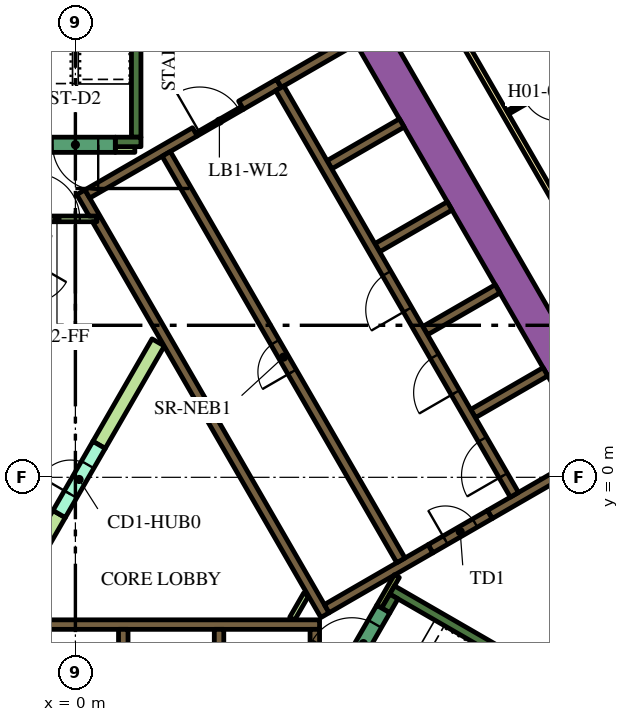
"""IFC4 building model, lengths in metres.
Left out: names, types, materials, properties, quantities, classifications, styles, units other than length and angle.
Written with IfcOpenShell. Run it as: python <this file> out.ifc"""

import sys

from ifc_helpers import new_model, si_unit, direction, frame, frame_2d, origin, place, context, subcontext, project, spatial, polyline, rectangle, outline, extrude, element, fill, save


model = new_model("IFC4")
c1 = context("Model", 3, precision=1e-05, world=origin(), true_north=direction((0.0, 1.0)))
c2 = subcontext(c1, "Body", "Model", "MODEL_VIEW")
j1 = project(units=[si_unit("LENGTHUNIT", "METRE"), si_unit("PLANEANGLEUNIT", "RADIAN")], contexts=[c1])
p1 = place(None, origin())
s1 = spatial("IfcSite", under=j1, at=p1, CompositionType="ELEMENT")
p2 = place(p1, origin())
s2 = spatial("IfcBuilding", under=s1, at=p2, CompositionType="ELEMENT")
p3 = place(p2, frame((0.0, 0.0, 31.5)))
s3 = spatial("IfcBuildingStorey", under=s2, at=p3, CompositionType="ELEMENT", Elevation=31.5)
p4 = place(p3, frame((6.711, 13.476, 0.0), z_axis=(0.0, 0.0, 1.0), x_axis=(0.500002723396, -0.866023831425, 0.0)))
e1 = element("IfcWall", 1, at=p4, inside=s3, PredefinedType="SOLIDWALL", context=c2, shape_type="SweptSolid", body=[
    extrude(rectangle(XDim=20.334, YDim=0.9, at=frame_2d((10.167, 0.0))), origin(), (0.0, 0.0, 1.0), 3.9),
])
p5 = place(p3, frame((11.695, -12.644, 0.0), z_axis=(0.0, 0.0, 1.0), x_axis=(0.500010229568, 0.86601949766, 0.0)))
e2 = element("IfcWall", 2, at=p5, inside=s3, PredefinedType="SOLIDWALL", context=c2, shape_type="SweptSolid", body=[
    extrude(rectangle(XDim=9.326, YDim=0.9, at=frame_2d((4.663, 0.0))), origin(), (0.0, 0.0, 1.0), 3.9),
])
p6 = place(p3, frame((8.334, -2.964, 0.0), z_axis=(0.0, 0.0, 1.0), x_axis=(0.866016039709, -0.500016218704, 0.0)))
e3 = element("IfcWall", 3, at=p6, inside=s3, PredefinedType="SOLIDWALL", context=c2, shape_type="SweptSolid", body=[
    extrude(rectangle(XDim=7.05, YDim=0.25, at=frame_2d((3.525, 0.0))), origin(), (0.0, 0.0, 1.0), 3.9),
])
p7 = place(p3, frame((8.168, -3.503, 0.0), z_axis=(0.0, 0.0, 1.0), x_axis=(0.49972245349, 0.866185586049, 0.0)))
e4 = element("IfcWall", 4, at=p7, inside=s3, PredefinedType="SOLIDWALL", context=c2, shape_type="SweptSolid", body=[
    extrude(rectangle(XDim=0.425, YDim=0.25, at=frame_2d((0.212, 0.0))), origin(), (0.0, 0.0, 1.0), 3.9),
])
p8 = place(p3, frame((1.6, 8.95, 0.0), z_axis=(0.0, 0.0, 1.0), x_axis=(0.0, 1.0, 0.0)))
e5 = element("IfcWall", 5, at=p8, inside=s3, PredefinedType="SOLIDWALL", context=c2, shape_type="SweptSolid", body=[
    extrude(rectangle(XDim=6.8, YDim=0.25, at=frame_2d((3.4, 0.0))), origin(), (0.0, 0.0, 1.0), 3.9),
])
p9 = place(p3, frame((1.05, 8.825, 0.0), z_axis=(0.0, 0.0, 1.0), x_axis=(1.0, 0.0, 0.0)))
e6 = element("IfcWall", 6, at=p9, inside=s3, PredefinedType="SOLIDWALL", context=c2, shape_type="SweptSolid", body=[
    extrude(rectangle(XDim=0.675, YDim=0.25, at=frame_2d((0.337, 0.0))), origin(), (0.0, 0.0, 1.0), 3.9),
])
p10 = place(p3, frame((-5.545, -3.875, 0.0), z_axis=(0.0, 0.0, 1.0), x_axis=(1.0, 0.0, 0.0)))
e7 = element("IfcWall", 7, at=p10, inside=s3, PredefinedType="SOLIDWALL", context=c2, shape_type="SweptSolid", body=[
    extrude(rectangle(XDim=11.97, YDim=0.25, at=frame_2d((5.985, 0.0))), origin(), (0.0, 0.0, 1.0), 3.9),
])
p11 = place(p3, frame((6.3, -7.268, 0.0), z_axis=(0.0, 0.0, 1.0), x_axis=(0.0, 1.0, 0.0)))
e8 = element("IfcWall", 8, at=p11, inside=s3, PredefinedType="SOLIDWALL", context=c2, shape_type="SweptSolid", body=[
    extrude(rectangle(XDim=3.268, YDim=0.25, at=frame_2d((1.634, 0.0))), origin(), (0.0, 0.0, 1.0), 3.9),
])
for number, where, z_axis, x_axis in (
    (9, (3.78, -4.0, 0.0), (0.0, 0.0, 1.0), (0.0, -1.0, 0.0)),
    (10, (1.26, -4.0, 0.0), (0.0, 0.0, 1.0), (0.0, -1.0, 0.0)),
    (11, (10.464, 1.677, 0.0), (0.0, 0.0, 1.0), (0.866, 0.5, 0.0)),
):
    element("IfcWall", number, at=place(p3, frame(where, z_axis=z_axis, x_axis=x_axis)), inside=s3, PredefinedType="SOLIDWALL", context=c2, shape_type="SweptSolid", body=[
        extrude(rectangle(XDim=2.2, YDim=0.25, at=frame_2d((1.1, 0.0))), origin(), (0.0, 0.0, 1.0), 3.9),
    ])
p12 = place(p3, frame((13.629, 0.594, 0.0), z_axis=(0.0, 0.0, 1.0), x_axis=(-0.86602790099, -0.499995674689, 0.0)))
e12 = element("IfcWall", 12, at=p12, inside=s3, PredefinedType="SOLIDWALL", context=c2, shape_type="SweptSolid", body=[
    extrude(rectangle(XDim=3.146, YDim=0.25, at=frame_2d((1.573, 0.0))), origin(), (0.0, 0.0, 1.0), 3.9),
])
p13 = place(p3, origin())
e13 = element("IfcWall", 13, at=p13, inside=s3, PredefinedType="SOLIDWALL", context=c2, shape_type="SweptSolid", body=[
    extrude(outline(polyline([(0.566, 6.725), (0.566, 6.875), (0.566, 6.875), (0.565, 6.875), (0.361, 6.875), (0.035, 7.439), (0.252, 7.564), (0.377, 7.348), (6.552, -3.348), (6.677, -3.564), (6.46, -3.689), (0.448, 6.725), (0.565, 6.725), (0.566, 6.725), (0.566, 6.725)])), origin(), (0.0, 0.0, 1.0), 3.9),
])
p14 = place(p3, frame((4.358, 9.791, 0.0), z_axis=(0.0, 0.0, 1.0), x_axis=(0.866079547155, 0.499906209203, 0.0)))
e14 = element("IfcWall", 14, at=p14, inside=s3, PredefinedType="SOLIDWALL", context=c2, shape_type="SweptSolid", body=[
    extrude(rectangle(XDim=1.15, YDim=0.25, at=frame_2d((0.575, 0.0))), origin(), (0.0, 0.0, 1.0), 3.9),
])
p15 = place(p3, frame((5.356, 10.367, 0.0), z_axis=(0.0, 0.0, 1.0), x_axis=(0.865978535641, 0.50008116922, 0.0)))
e15 = element("IfcWall", 15, at=p15, inside=s3, PredefinedType="SOLIDWALL", context=c2, shape_type="SweptSolid", body=[
    extrude(rectangle(XDim=2.278, YDim=0.25, at=frame_2d((1.139, 0.0))), origin(), (0.0, 0.0, 1.0), 3.9),
])
p16 = place(p3, frame((0.314, 7.456, 0.0), z_axis=(0.0, 0.0, 1.0), x_axis=(0.866013897511, 0.50001992892, 0.0)))
e16 = element("IfcWall", 16, at=p16, inside=s3, PredefinedType="SOLIDWALL", context=c2, shape_type="SweptSolid", body=[
    extrude(rectangle(XDim=3.268, YDim=0.25, at=frame_2d((1.634, 0.0))), origin(), (0.0, 0.0, 1.0), 3.9),
])
p17 = place(p3, frame((6.614, -3.456, 0.0), z_axis=(0.0, 0.0, 1.0), x_axis=(0.86602447079, 0.500001615989, 0.0)))
e17 = element("IfcWall", 17, at=p17, inside=s3, PredefinedType="SOLIDWALL", context=c2, shape_type="SweptSolid", body=[
    extrude(rectangle(XDim=3.154, YDim=0.25, at=frame_2d((1.577, 0.0))), origin(), (0.0, 0.0, 1.0), 3.9),
])
for number, where, z_axis, x_axis in (
    (18, (6.684, 8.224, 0.0), (0.0, 0.0, 1.0), (0.866, 0.5, 0.0)),
    (19, (7.944, 6.041, 0.0), (0.0, 0.0, 1.0), (0.866, 0.5, 0.0)),
    (20, (9.204, 3.859, 0.0), (0.0, 0.0, 1.0), (0.866, 0.5, 0.0)),
):
    element("IfcWall", number, at=place(p3, frame(where, z_axis=z_axis, x_axis=x_axis)), inside=s3, PredefinedType="SOLIDWALL", context=c2, shape_type="SweptSolid", body=[
        extrude(rectangle(XDim=2.2, YDim=0.25, at=frame_2d((1.1, 0.0))), origin(), (0.0, 0.0, 1.0), 3.9),
    ])
p18 = place(p3, frame((5.705, -3.718, 0.0), z_axis=(0.0, 0.0, 1.0), x_axis=(0.499962090823, 0.866047289552, 0.0)))
e21 = element("IfcWall", 21, at=p18, inside=s3, PredefinedType="PARTITIONING", context=c2, shape_type="SweptSolid", body=[
    extrude(rectangle(XDim=0.735, YDim=0.15, at=frame_2d((0.367, 0.0))), origin(), (0.0, 0.0, 1.0), 2.75),
])
p19 = place(p3, frame((8.459, -2.599, 0.0), z_axis=(0.0, 0.0, 1.0), x_axis=(-0.500041054325, -0.866001699761, 0.0)))
e22 = element("IfcWall", 22, at=p19, inside=s3, PredefinedType="PARTITIONING", context=c2, shape_type="SweptSolid", body=[
    extrude(rectangle(XDim=0.929, YDim=0.15, at=frame_2d((0.464, 0.0))), origin(), (0.0, 0.0, 1.0), 3.9),
])
e23 = element("IfcWall", 23, at=p13, inside=s3, PredefinedType="PARTITIONING", context=c2, shape_type="SweptSolid", body=[
    extrude(outline(polyline([(-0.59, -0.872), (-0.265, -1.059), (-1.822, -3.756), (-2.147, -3.568), (-0.59, -0.872)])), origin(), (0.0, 0.0, 1.0), 2.75),
])
e24 = element("IfcWall", 24, at=p13, inside=s3, PredefinedType="PARTITIONING", context=c2, shape_type="SweptSolid", body=[
    extrude(outline(polyline([(2.017, 3.643), (2.342, 3.456), (0.785, 0.76), (0.46, 0.947), (2.017, 3.643)])), origin(), (0.0, 0.0, 1.0), 2.75),
])
p20 = place(p3, frame((1.05, 8.625, 0.0), z_axis=(0.0, 0.0, 1.0), x_axis=(1.0, 0.0, 0.0)))
e25 = element("IfcWall", 25, at=p20, inside=s3, PredefinedType="PARTITIONING", context=c2, shape_type="SweptSolid", body=[
    extrude(rectangle(XDim=0.514, YDim=0.15, at=frame_2d((0.257, 0.0))), origin(), (0.0, 0.0, 1.0), 2.75),
])
p21 = place(p3, frame((11.553, -0.46, 0.0), z_axis=(0.0, 0.0, 1.0), x_axis=(-0.500006514828, 0.866021642414, 0.0)))
e26 = element("IfcWall", 26, at=p21, inside=s3, PredefinedType="SOLIDWALL", context=c2, shape_type="SweptSolid", body=[
    extrude(rectangle(XDim=12.35, YDim=0.25, at=frame_2d((6.175, 0.0))), origin(), (0.0, 0.0, 1.0), 3.9),
])
p22 = place(p21, frame((0.585, 0.0, 0.0)))
e27 = element("IfcOpeningElement", 27, at=p22, cuts=e26, PredefinedType="OPENING", context=c2, shape_type="SweptSolid", body=[
    extrude(rectangle(XDim=1.1, YDim=2.1, at=frame_2d((0.55, 1.05))), frame((0.0, 0.135, 0.0), z_axis=(0.0, -1.0, 0.0), x_axis=(1.0, 0.0, 0.0)), (0.0, 0.0, 1.0), 0.27),
])
p23 = place(p21, frame((3.105, 0.0, 0.0)))
e28 = element("IfcOpeningElement", 28, at=p23, cuts=e26, PredefinedType="OPENING", context=c2, shape_type="SweptSolid", body=[
    extrude(rectangle(XDim=1.1, YDim=2.1, at=frame_2d((0.55, 1.05))), frame((0.0, 0.135, 0.0), z_axis=(0.0, -1.0, 0.0), x_axis=(1.0, 0.0, 0.0)), (0.0, 0.0, 1.0), 0.27),
])
p24 = place(p21, frame((5.625, 0.0, 0.0)))
e29 = element("IfcOpeningElement", 29, at=p24, cuts=e26, PredefinedType="OPENING", context=c2, shape_type="SweptSolid", body=[
    extrude(rectangle(XDim=1.1, YDim=2.1, at=frame_2d((0.55, 1.05))), frame((0.0, 0.135, 0.0), z_axis=(0.0, -1.0, 0.0), x_axis=(1.0, 0.0, 0.0)), (0.0, 0.0, 1.0), 0.27),
])
p25 = place(p3, frame((8.565, -2.185, 0.0), z_axis=(0.0, 0.0, 1.0), x_axis=(-0.499997954832, 0.866026584559, 0.0)))
e30 = element("IfcWall", 30, at=p25, inside=s3, PredefinedType="SOLIDWALL", context=c2, shape_type="SweptSolid", body=[
    extrude(rectangle(XDim=12.35, YDim=0.25, at=frame_2d((6.175, 0.0))), origin(), (0.0, 0.0, 1.0), 3.9),
])
p26 = place(p25, frame((5.725, 0.0, 0.0)))
e31 = element("IfcOpeningElement", 31, at=p26, cuts=e30, PredefinedType="OPENING", context=c2, shape_type="SweptSolid", body=[
    extrude(rectangle(XDim=0.9, YDim=2.1, at=frame_2d((0.45, 1.05))), frame((0.0, 0.135, 0.0), z_axis=(0.0, -1.0, 0.0), x_axis=(1.0, 0.0, 0.0)), (0.0, 0.0, 1.0), 0.27),
])
p27 = place(p3, frame((7.053, -5.284, 0.0), z_axis=(0.0, 0.0, 1.0), x_axis=(0.500078061341, 0.865980330357, 0.0)))
e32 = element("IfcWall", 32, at=p27, inside=s3, PredefinedType="SOLIDWALL", context=c2, shape_type="SweptSolid", body=[
    extrude(rectangle(XDim=2.1, YDim=0.4, at=frame_2d((1.05, 0.0))), origin(), (0.0, 0.0, 1.0), 3.9),
])
p28 = place(p27, frame((0.45, 0.0, 0.0)))
e33 = element("IfcOpeningElement", 33, at=p28, cuts=e32, PredefinedType="OPENING", context=c2, shape_type="SweptSolid", body=[
    extrude(rectangle(XDim=1.2, YDim=2.1, at=frame_2d((0.6, 1.05))), frame((0.0, 0.21, 0.0), z_axis=(0.0, -1.0, 0.0), x_axis=(1.0, 0.0, 0.0)), (0.0, 0.0, 1.0), 0.42),
])
p29 = place(p3, frame((9.346, -1.879, 0.0), z_axis=(0.0, 0.0, 1.0), x_axis=(0.866047807691, 0.499961193289, 0.0)))
e34 = element("IfcWall", 34, at=p29, inside=s3, PredefinedType="SOLIDWALL", context=c2, shape_type="SweptSolid", body=[
    extrude(rectangle(XDim=1.8, YDim=0.25, at=frame_2d((0.9, 0.0))), origin(), (0.0, 0.0, 1.0), 3.9),
])
p30 = place(p29, frame((0.45, 0.0, 0.0)))
e35 = element("IfcOpeningElement", 35, at=p30, cuts=e34, PredefinedType="OPENING", context=c2, shape_type="SweptSolid", body=[
    extrude(rectangle(XDim=0.9, YDim=2.1, at=frame_2d((0.45, 1.05))), frame((0.0, 0.135, 0.0), z_axis=(0.0, -1.0, 0.0), x_axis=(1.0, 0.0, 0.0)), (0.0, 0.0, 1.0), 0.27),
])
p31 = place(p3, frame((1.05, 8.75, 0.0), z_axis=(0.0, 0.0, 1.0), x_axis=(-1.0, 0.0, 0.0)))
e36 = element("IfcWall", 36, at=p31, inside=s3, PredefinedType="SOLIDWALL", context=c2, shape_type="SweptSolid", body=[
    extrude(rectangle(XDim=2.1, YDim=0.4, at=frame_2d((1.05, 0.0))), origin(), (0.0, 0.0, 1.0), 3.9),
])
p32 = place(p31, frame((0.45, 0.0, 0.0)))
e37 = element("IfcOpeningElement", 37, at=p32, cuts=e36, PredefinedType="OPENING", context=c2, shape_type="SweptSolid", body=[
    extrude(rectangle(XDim=1.2, YDim=2.1, at=frame_2d((0.6, 1.05))), frame((0.0, 0.21, 0.0), z_axis=(0.0, -1.0, 0.0), x_axis=(1.0, 0.0, 0.0)), (0.0, 0.0, 1.0), 0.42),
])
p33 = place(p3, frame((-0.427, -0.966, 0.0), z_axis=(0.0, 0.0, 1.0), x_axis=(0.49994051562, 0.866059744384, 0.0)))
e38 = element("IfcWall", 38, at=p33, inside=s3, PredefinedType="PARTITIONING", context=c2, shape_type="SweptSolid", body=[
    extrude(rectangle(XDim=2.1, YDim=0.375, at=frame_2d((1.05, 0.0))), origin(), (0.0, 0.0, 1.0), 2.75),
])
p34 = place(p33, frame((0.6, 0.0, 0.0)))
e39 = element("IfcOpeningElement", 39, at=p34, cuts=e38, PredefinedType="OPENING", context=c2, shape_type="SweptSolid", body=[
    extrude(rectangle(XDim=0.9, YDim=2.1, at=frame_2d((0.45, 1.05))), frame((0.0, 0.198, 0.0), z_axis=(0.0, -1.0, 0.0), x_axis=(1.0, 0.0, 0.0)), (0.0, 0.0, 1.0), 0.395),
])
p35 = place(p3, frame((-1.534, 6.8, 0.0), z_axis=(0.0, 0.0, 1.0), x_axis=(1.0, 0.0, 0.0)))
e40 = element("IfcWall", 40, at=p35, inside=s3, PredefinedType="PARTITIONING", context=c2, shape_type="SweptSolid", body=[
    extrude(rectangle(XDim=2.1, YDim=0.15, at=frame_2d((1.05, 0.0))), origin(), (0.0, 0.0, 1.0), 2.75),
])
p36 = place(p35, frame((0.45, 0.0, 0.0)))
e41 = element("IfcOpeningElement", 41, at=p36, cuts=e40, PredefinedType="OPENING", context=c2, shape_type="SweptSolid", body=[
    extrude(rectangle(XDim=1.2, YDim=2.1, at=frame_2d((0.6, 1.05))), frame((0.0, 0.085, 0.0), z_axis=(0.0, -1.0, 0.0), x_axis=(1.0, 0.0, 0.0)), (0.0, 0.0, 1.0), 0.17),
])
p37 = place(p3, frame((3.183, 9.02, 0.0), z_axis=(0.0, 0.0, 1.0), x_axis=(0.866034573852, 0.49998411664, 0.0)))
e42 = element("IfcWall", 42, at=p37, inside=s3, PredefinedType="PARTITIONING", context=c2, shape_type="SweptSolid", body=[
    extrude(rectangle(XDim=1.4, YDim=0.09, at=frame_2d((0.7, 0.0))), origin(), (0.0, 0.0, 1.0), 2.75),
])
p38 = place(p37, frame((0.1, 0.0, 0.0)))
e43 = element("IfcOpeningElement", 43, at=p38, cuts=e42, PredefinedType="OPENING", context=c2, shape_type="SweptSolid", body=[
    extrude(rectangle(XDim=1.2, YDim=2.1, at=frame_2d((0.6, 1.05))), frame((0.0, 0.055, 0.0), z_axis=(0.0, -1.0, 0.0), x_axis=(1.0, 0.0, 0.0)), (0.0, 0.0, 1.0), 0.11),
])
p39 = place(p3, frame((6.163, 18.475, 0.0), z_axis=(0.0, 0.0, 1.0), x_axis=(0.500001317485, -0.866024643133, 0.0)))
e44 = element("IfcWall", 44, at=p39, inside=s3, PredefinedType="PARTITIONING", context=c2, shape_type="SweptSolid", body=[
    extrude(rectangle(XDim=25.767, YDim=0.15, at=frame_2d((12.883, 0.0))), origin(), (0.0, 0.0, 1.0), 2.75),
])
p40 = place(p39, frame((24.586, 0.0, 0.0)))
e45 = element("IfcOpeningElement", 45, at=p40, cuts=e44, PredefinedType="OPENING", context=c2, shape_type="SweptSolid", body=[
    extrude(rectangle(XDim=1.0, YDim=2.1, at=frame_2d((0.5, 1.05))), frame((0.0, 0.085, 0.0), z_axis=(0.0, -1.0, 0.0), x_axis=(1.0, 0.0, 0.0)), (0.0, 0.0, 1.0), 0.17),
])
p41 = place(p39, frame((19.319, 0.0, 0.0)))
e46 = element("IfcOpeningElement", 46, at=p41, cuts=e44, PredefinedType="OPENING", context=c2, shape_type="SweptSolid", body=[
    extrude(rectangle(XDim=1.0, YDim=2.1, at=frame_2d((0.5, 1.05))), frame((0.0, 0.085, 0.0), z_axis=(0.0, -1.0, 0.0), x_axis=(1.0, 0.0, 0.0)), (0.0, 0.0, 1.0), 0.17),
])
p42 = place(p39, frame((18.012, 0.0, 0.0)))
e47 = element("IfcOpeningElement", 47, at=p42, cuts=e44, PredefinedType="OPENING", context=c2, shape_type="SweptSolid", body=[
    extrude(rectangle(XDim=1.0, YDim=2.1, at=frame_2d((0.5, 1.05))), frame((0.0, 0.085, 0.0), z_axis=(0.0, -1.0, 0.0), x_axis=(1.0, 0.0, 0.0)), (0.0, 0.0, 1.0), 0.17),
])
p43 = place(p39, frame((6.824, 0.0, 0.0)))
e48 = element("IfcOpeningElement", 48, at=p43, cuts=e44, PredefinedType="OPENING", context=c2, shape_type="SweptSolid", body=[
    extrude(rectangle(XDim=1.1, YDim=2.1, at=frame_2d((0.55, 1.05))), frame((0.0, 0.085, 0.0), z_axis=(0.0, -1.0, 0.0), x_axis=(1.0, 0.0, 0.0)), (0.0, 0.0, 1.0), 0.17),
])
p44 = place(p39, frame((4.658, 0.0, 0.0)))
e49 = element("IfcOpeningElement", 49, at=p44, cuts=e44, PredefinedType="OPENING", context=c2, shape_type="SweptSolid", body=[
    extrude(rectangle(XDim=0.9, YDim=2.1, at=frame_2d((0.45, 1.05))), frame((0.0, 0.085, 0.0), z_axis=(0.0, -1.0, 0.0), x_axis=(1.0, 0.0, 0.0)), (0.0, 0.0, 1.0), 0.17),
])
p45 = place(p39, frame((0.18, 0.0, 0.0)))
e50 = element("IfcOpeningElement", 50, at=p45, cuts=e44, PredefinedType="OPENING", context=c2, shape_type="SweptSolid", body=[
    extrude(rectangle(XDim=1.0, YDim=2.1, at=frame_2d((0.5, 1.05))), frame((0.0, 0.085, 0.0), z_axis=(0.0, -1.0, 0.0), x_axis=(1.0, 0.0, 0.0)), (0.0, 0.0, 1.0), 0.17),
])
p46 = place(p3, frame((13.799, 10.999, 0.0), z_axis=(0.0, 0.0, 1.0), x_axis=(-0.866034573852, -0.49998411664, 0.0)))
e51 = element("IfcWall", 51, at=p46, inside=s3, PredefinedType="PARTITIONING", context=c2, shape_type="SweptSolid", body=[
    extrude(rectangle(XDim=2.8, YDim=0.1, at=frame_2d((1.4, 0.0))), origin(), (0.0, 0.0, 1.0), 2.75),
])
p47 = place(p46, frame((1.25, 0.0, 0.0)))
e52 = element("IfcOpeningElement", 52, at=p47, cuts=e51, PredefinedType="OPENING", context=c2, shape_type="SweptSolid", body=[
    extrude(rectangle(XDim=1.0, YDim=2.1, at=frame_2d((0.5, 1.05))), frame((0.0, 0.06, 0.0), z_axis=(0.0, -1.0, 0.0), x_axis=(1.0, 0.0, 0.0)), (0.0, 0.0, 1.0), 0.12),
])
p48 = place(p22, origin())
e53 = element("IfcDoor", 53, at=p48, inside=s3, OperationType="DOUBLE_DOOR_SLIDING", PredefinedType="DOOR", context=c2, shape_type="SweptSolid", body=[
    extrude(rectangle(XDim=1.1, YDim=2.1, at=frame_2d((0.55, 1.05))), frame((0.0, 0.025, 0.0), z_axis=(0.0, -1.0, 0.0), x_axis=(1.0, 0.0, 0.0)), (0.0, 0.0, 1.0), 0.05),
])
fill(e27, e53)
p49 = place(p23, origin())
e54 = element("IfcDoor", 54, at=p49, inside=s3, OperationType="DOUBLE_DOOR_SLIDING", PredefinedType="DOOR", context=c2, shape_type="SweptSolid", body=[
    extrude(rectangle(XDim=1.1, YDim=2.1, at=frame_2d((0.55, 1.05))), frame((0.0, 0.025, 0.0), z_axis=(0.0, -1.0, 0.0), x_axis=(1.0, 0.0, 0.0)), (0.0, 0.0, 1.0), 0.05),
])
fill(e28, e54)
p50 = place(p24, origin())
e55 = element("IfcDoor", 55, at=p50, inside=s3, OperationType="DOUBLE_DOOR_SLIDING", PredefinedType="DOOR", context=c2, shape_type="SweptSolid", body=[
    extrude(rectangle(XDim=1.1, YDim=2.1, at=frame_2d((0.55, 1.05))), frame((0.0, 0.025, 0.0), z_axis=(0.0, -1.0, 0.0), x_axis=(1.0, 0.0, 0.0)), (0.0, 0.0, 1.0), 0.05),
])
fill(e29, e55)
p51 = place(p26, origin())
e56 = element("IfcDoor", 56, at=p51, inside=s3, OperationType="SINGLE_SWING_LEFT", PredefinedType="DOOR", context=c2, shape_type="SweptSolid", body=[
    extrude(rectangle(XDim=0.9, YDim=2.1, at=frame_2d((0.45, 1.05))), frame((0.0, 0.025, 0.0), z_axis=(0.0, -1.0, 0.0), x_axis=(1.0, 0.0, 0.0)), (0.0, 0.0, 1.0), 0.05),
])
fill(e31, e56)
p52 = place(p28, origin())
e57 = element("IfcDoor", 57, at=p52, inside=s3, OperationType="SINGLE_SWING_LEFT", PredefinedType="DOOR", context=c2, shape_type="SweptSolid", body=[
    extrude(rectangle(XDim=1.2, YDim=2.1, at=frame_2d((0.6, 1.05))), frame((0.0, 0.025, 0.0), z_axis=(0.0, -1.0, 0.0), x_axis=(1.0, 0.0, 0.0)), (0.0, 0.0, 1.0), 0.05),
])
fill(e33, e57)
p53 = place(p30, origin())
e58 = element("IfcDoor", 58, at=p53, inside=s3, OperationType="SINGLE_SWING_LEFT", PredefinedType="DOOR", context=c2, shape_type="SweptSolid", body=[
    extrude(rectangle(XDim=0.9, YDim=2.1, at=frame_2d((0.45, 1.05))), frame((0.0, 0.025, 0.0), z_axis=(0.0, -1.0, 0.0), x_axis=(1.0, 0.0, 0.0)), (0.0, 0.0, 1.0), 0.05),
])
fill(e35, e58)
p54 = place(p32, origin())
e59 = element("IfcDoor", 59, at=p54, inside=s3, OperationType="SINGLE_SWING_LEFT", PredefinedType="DOOR", context=c2, shape_type="SweptSolid", body=[
    extrude(rectangle(XDim=1.2, YDim=2.1, at=frame_2d((0.6, 1.05))), frame((0.0, 0.025, 0.0), z_axis=(0.0, -1.0, 0.0), x_axis=(1.0, 0.0, 0.0)), (0.0, 0.0, 1.0), 0.05),
])
fill(e37, e59)
p55 = place(p34, origin())
e60 = element("IfcDoor", 60, at=p55, inside=s3, OperationType="SINGLE_SWING_LEFT", PredefinedType="DOOR", context=c2, shape_type="SweptSolid", body=[
    extrude(rectangle(XDim=0.9, YDim=2.1, at=frame_2d((0.45, 1.05))), frame((0.0, 0.025, 0.0), z_axis=(0.0, -1.0, 0.0), x_axis=(1.0, 0.0, 0.0)), (0.0, 0.0, 1.0), 0.05),
])
fill(e39, e60)
p56 = place(p36, origin())
e61 = element("IfcDoor", 61, at=p56, inside=s3, OperationType="SINGLE_SWING_LEFT", PredefinedType="DOOR", context=c2, shape_type="SweptSolid", body=[
    extrude(rectangle(XDim=1.2, YDim=2.1, at=frame_2d((0.6, 1.05))), frame((0.0, 0.025, 0.0), z_axis=(0.0, -1.0, 0.0), x_axis=(1.0, 0.0, 0.0)), (0.0, 0.0, 1.0), 0.05),
])
fill(e41, e61)
p57 = place(p38, origin())
e62 = element("IfcDoor", 62, at=p57, inside=s3, OperationType="SINGLE_SWING_LEFT", PredefinedType="DOOR", context=c2, shape_type="SweptSolid", body=[
    extrude(rectangle(XDim=1.2, YDim=2.1, at=frame_2d((0.6, 1.05))), frame((0.0, 0.025, 0.0), z_axis=(0.0, -1.0, 0.0), x_axis=(1.0, 0.0, 0.0)), (0.0, 0.0, 1.0), 0.05),
])
fill(e43, e62)
p58 = place(p47, origin())
e63 = element("IfcDoor", 63, at=p58, inside=s3, OperationType="SINGLE_SWING_LEFT", PredefinedType="DOOR", context=c2, shape_type="SweptSolid", body=[
    extrude(rectangle(XDim=1.0, YDim=2.1, at=frame_2d((0.5, 1.05))), frame((0.0, 0.025, 0.0), z_axis=(0.0, -1.0, 0.0), x_axis=(1.0, 0.0, 0.0)), (0.0, 0.0, 1.0), 0.05),
])
fill(e52, e63)
save(model, sys.argv[1])
